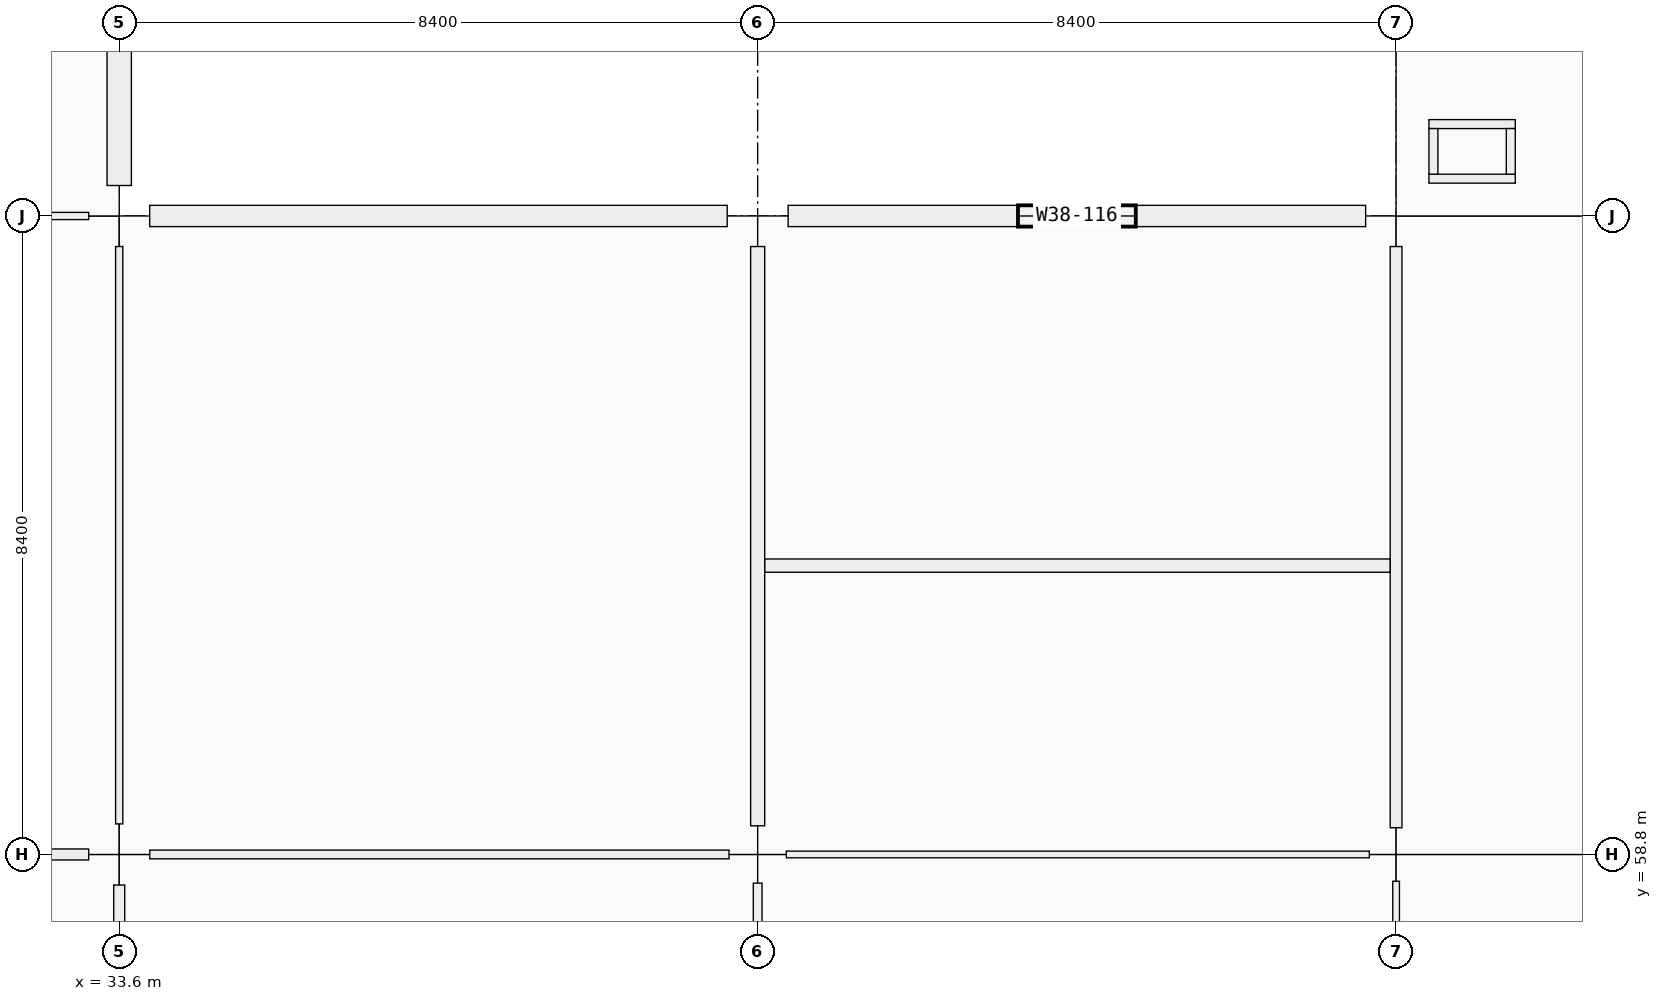
"""IFC4 building model, lengths in metres.
Left out: names, types, materials, properties, quantities, classifications, styles, units other than length and angle.
Written with IfcOpenShell. Run it as: python <this file> out.ifc"""

import sys

from ifc_helpers import new_model, si_unit, direction, frame, frame_2d, origin, origin_2d, place, context, subcontext, project, spatial, rectangle, extrude, element, fill, save


model = new_model("IFC4")
c1 = context("Model", 3, precision=1e-05, world=origin(), true_north=direction((0.0, 1.0)))
c2 = subcontext(c1, "Body", "Model", "MODEL_VIEW")
j1 = project(units=[si_unit("LENGTHUNIT", "METRE"), si_unit("PLANEANGLEUNIT", "RADIAN")], contexts=[c1])
p1 = place(None, origin())
s1 = spatial("IfcSite", under=j1, at=p1, CompositionType="ELEMENT")
p2 = place(p1, origin())
s2 = spatial("IfcBuilding", under=s1, at=p2, CompositionType="ELEMENT")
p3 = place(p2, frame((0.0, 0.0, 5.76)))
s3 = spatial("IfcBuildingStorey", under=s2, at=p3, CompositionType="ELEMENT", Elevation=5.76)
for number, where, z_axis, x_axis in (
    (1, (33.6, 58.8, 0.0), (0.0, 0.0, 1.0), (1.0, 0.0, 0.0)),
    (2, (33.6, 67.2, 0.0), (0.0, 0.0, 1.0), (1.0, 0.0, 0.0)),
):
    element("IfcColumn", number, at=place(p3, frame(where, z_axis=z_axis, x_axis=x_axis)), inside=s3, PredefinedType="COLUMN", context=c2, shape_type="SweptSolid", body=[
        extrude(rectangle(XDim=0.8, YDim=0.8, at=origin_2d()), origin(), (0.0, 0.0, 1.0), 4.5),
    ])
p4 = place(p3, frame((42.0, 58.8, 0.0), z_axis=(0.0, 0.0, 1.0), x_axis=(1.0, 0.0, 0.0)))
e3 = element("IfcColumn", 3, at=p4, inside=s3, PredefinedType="COLUMN", context=c2, shape_type="SweptSolid", body=[
    extrude(rectangle(XDim=0.75, YDim=0.75, at=origin_2d()), origin(), (0.0, 0.0, 1.0), 4.5),
])
p5 = place(p3, frame((42.0, 67.2, 0.0), z_axis=(0.0, 0.0, 1.0), x_axis=(1.0, 0.0, 0.0)))
e4 = element("IfcColumn", 4, at=p5, inside=s3, PredefinedType="COLUMN", context=c2, shape_type="SweptSolid", body=[
    extrude(rectangle(XDim=0.8, YDim=0.8, at=origin_2d()), origin(), (0.0, 0.0, 1.0), 4.5),
])
p6 = place(p3, frame((50.4, 58.8, 0.0), z_axis=(0.0, 0.0, 1.0), x_axis=(1.0, 0.0, 0.0)))
e5 = element("IfcColumn", 5, at=p6, inside=s3, PredefinedType="COLUMN", context=c2, shape_type="SweptSolid", body=[
    extrude(rectangle(XDim=0.7, YDim=0.7, at=origin_2d()), origin(), (0.0, 0.0, 1.0), 4.5),
])
p7 = place(p3, frame((50.4, 67.2, 0.0), z_axis=(0.0, 0.0, 1.0), x_axis=(1.0, 0.0, 0.0)))
e6 = element("IfcColumn", 6, at=p7, inside=s3, PredefinedType="COLUMN", context=c2, shape_type="SweptSolid", body=[
    extrude(rectangle(XDim=0.8, YDim=0.8, at=origin_2d()), origin(), (0.0, 0.0, 1.0), 4.5),
])
p8 = place(p3, frame((33.6, 75.199, 0.0), z_axis=(0.0, 0.0, 1.0), x_axis=(0.0, -1.0, 0.0)))
e7 = element("IfcWall", 7, at=p8, inside=s3, PredefinedType="SOLIDWALL", context=c2, shape_type="SweptSolid", body=[
    extrude(rectangle(XDim=7.598, YDim=0.32, at=frame_2d((3.799, 0.0))), origin(), (0.0, 0.0, 1.0), 3.4),
])
p9 = place(p8, frame((2.524, 0.0, 0.9)))
e8 = element("IfcOpeningElement", 8, at=p9, cuts=e7, PredefinedType="OPENING", context=c2, shape_type="SweptSolid", body=[
    extrude(rectangle(XDim=2.55, YDim=1.95, at=frame_2d((1.275, 0.975))), frame((0.0, 0.16, 0.0), z_axis=(0.0, -1.0, 0.0), x_axis=(1.0, 0.0, 0.0)), (0.0, 0.0, 1.0), 0.32),
])
p10 = place(p3, frame((34.001, 67.2, 0.0), z_axis=(0.0, 0.0, 1.0), x_axis=(1.0, 0.0, 0.0)))
e9 = element("IfcWall", 9, at=p10, inside=s3, PredefinedType="SOLIDWALL", context=c2, shape_type="SweptSolid", body=[
    extrude(rectangle(XDim=7.598, YDim=0.28, at=frame_2d((3.799, 0.0))), origin(), (0.0, 0.0, 1.0), 3.4),
])
p11 = place(p10, frame((3.149, 0.0, 0.9)))
e10 = element("IfcOpeningElement", 10, at=p11, cuts=e9, PredefinedType="OPENING", context=c2, shape_type="SweptSolid", body=[
    extrude(rectangle(XDim=1.3, YDim=1.95, at=frame_2d((0.65, 0.975))), frame((0.0, 0.14, 0.0), z_axis=(0.0, -1.0, 0.0), x_axis=(1.0, 0.0, 0.0)), (0.0, 0.0, 1.0), 0.28),
])
p12 = place(p3, frame((42.401, 67.2, 0.0), z_axis=(0.0, 0.0, 1.0), x_axis=(1.0, 0.0, 0.0)))
e11 = element("IfcWall", 11, at=p12, inside=s3, PredefinedType="SOLIDWALL", context=c2, shape_type="SweptSolid", body=[
    extrude(rectangle(XDim=7.598, YDim=0.28, at=frame_2d((3.799, 0.0))), origin(), (0.0, 0.0, 1.0), 3.4),
])
p13 = place(p12, frame((3.024, 0.0, 0.9)))
e12 = element("IfcOpeningElement", 12, at=p13, cuts=e11, PredefinedType="OPENING", context=c2, shape_type="SweptSolid", body=[
    extrude(rectangle(XDim=1.55, YDim=1.6, at=frame_2d((0.775, 0.8))), frame((0.0, 0.14, 0.0), z_axis=(0.0, -1.0, 0.0), x_axis=(1.0, 0.0, 0.0)), (0.0, 0.0, 1.0), 0.28),
])
for number, where, z_axis, x_axis in (
    (13, (50.832, 67.691, 0.0), (0.0, 0.0, 1.0), (1.0, 0.0, 0.0)),
    (14, (50.832, 68.409, 0.0), (0.0, 0.0, 1.0), (1.0, 0.0, 0.0)),
):
    element("IfcWall", number, at=place(p3, frame(where, z_axis=z_axis, x_axis=x_axis)), inside=s3, PredefinedType="PARTITIONING", context=c2, shape_type="SweptSolid", body=[
        extrude(rectangle(XDim=1.136, YDim=0.118, at=frame_2d((0.568, 0.0))), origin(), (0.0, 0.0, 1.0), 3.48),
    ])
for number, where, z_axis, x_axis in (
    (15, (50.891, 67.75, 0.0), (0.0, 0.0, 1.0), (0.0, 1.0, 0.0)),
    (16, (51.909, 67.75, 0.0), (0.0, 0.0, 1.0), (0.0, 1.0, 0.0)),
):
    element("IfcWall", number, at=place(p3, frame(where, z_axis=z_axis, x_axis=x_axis)), inside=s3, PredefinedType="PARTITIONING", context=c2, shape_type="SweptSolid", body=[
        extrude(rectangle(XDim=0.6, YDim=0.118, at=frame_2d((0.3, 0.0))), origin(), (0.0, 0.0, 1.0), 3.48),
    ])
p14 = place(p3, frame((25.602, 58.8, 0.0), z_axis=(0.0, 0.0, 1.0), x_axis=(1.0, 0.0, 0.0)))
e17 = element("IfcWall", 17, at=p14, inside=s3, PredefinedType="PARTITIONING", context=c2, shape_type="SweptSolid", body=[
    extrude(rectangle(XDim=7.596, YDim=0.145, at=frame_2d((3.798, 0.0))), origin(), (0.0, 0.0, 1.0), 2.4),
])
p15 = place(p14, frame((3.268, 0.0, 0.0)))
e18 = element("IfcOpeningElement", 18, at=p15, cuts=e17, PredefinedType="OPENING", context=c2, shape_type="SweptSolid", body=[
    extrude(rectangle(XDim=1.06, YDim=2.22, at=frame_2d((0.53, 1.11))), frame((0.0, 0.073, 0.0), z_axis=(0.0, -1.0, 0.0), x_axis=(1.0, 0.0, 0.0)), (0.0, 0.0, 1.0), 0.145),
])
p16 = place(p3, frame((25.602, 67.2, 0.0), z_axis=(0.0, 0.0, 1.0), x_axis=(1.0, 0.0, 0.0)))
e19 = element("IfcWall", 19, at=p16, inside=s3, PredefinedType="PARTITIONING", context=c2, shape_type="SweptSolid", body=[
    extrude(rectangle(XDim=7.596, YDim=0.095, at=frame_2d((3.798, 0.0))), origin(), (0.0, 0.0, 1.0), 2.4),
])
p17 = place(p16, frame((3.258, 0.0, 0.0)))
e20 = element("IfcOpeningElement", 20, at=p17, cuts=e19, PredefinedType="OPENING", context=c2, shape_type="SweptSolid", body=[
    extrude(rectangle(XDim=1.08, YDim=2.22, at=frame_2d((0.54, 1.11))), frame((0.0, 0.047, 0.0), z_axis=(0.0, -1.0, 0.0), x_axis=(1.0, 0.0, 0.0)), (0.0, 0.0, 1.0), 0.095),
])
p18 = place(p3, frame((34.002, 58.8, 0.0), z_axis=(0.0, 0.0, 1.0), x_axis=(1.0, 0.0, 0.0)))
e21 = element("IfcWall", 21, at=p18, inside=s3, PredefinedType="PARTITIONING", context=c2, shape_type="SweptSolid", body=[
    extrude(rectangle(XDim=7.621, YDim=0.115, at=frame_2d((3.811, 0.0))), origin(), (0.0, 0.0, 1.0), 2.4),
])
p19 = place(p18, frame((3.28, 0.0, 0.0)))
e22 = element("IfcOpeningElement", 22, at=p19, cuts=e21, PredefinedType="OPENING", context=c2, shape_type="SweptSolid", body=[
    extrude(rectangle(XDim=1.06, YDim=2.22, at=frame_2d((0.53, 1.11))), frame((0.0, 0.058, 0.0), z_axis=(0.0, -1.0, 0.0), x_axis=(1.0, 0.0, 0.0)), (0.0, 0.0, 1.0), 0.115),
])
p20 = place(p3, frame((42.377, 58.8, 0.0), z_axis=(0.0, 0.0, 1.0), x_axis=(1.0, 0.0, 0.0)))
e23 = element("IfcWall", 23, at=p20, inside=s3, PredefinedType="PARTITIONING", context=c2, shape_type="SweptSolid", body=[
    extrude(rectangle(XDim=7.671, YDim=0.088, at=frame_2d((3.835, 0.0))), origin(), (0.0, 0.0, 1.0), 2.4),
])
p21 = place(p3, frame((33.6, 50.802, 0.0), z_axis=(0.0, 0.0, 1.0), x_axis=(0.0, 1.0, 0.0)))
e24 = element("IfcWall", 24, at=p21, inside=s3, PredefinedType="PARTITIONING", context=c2, shape_type="SweptSolid", body=[
    extrude(rectangle(XDim=7.596, YDim=0.145, at=frame_2d((3.798, 0.0))), origin(), (0.0, 0.0, 1.0), 2.4),
])
p22 = place(p21, frame((3.318, 0.0, 0.0)))
e25 = element("IfcOpeningElement", 25, at=p22, cuts=e24, PredefinedType="OPENING", context=c2, shape_type="SweptSolid", body=[
    extrude(rectangle(XDim=0.96, YDim=2.18, at=frame_2d((0.48, 1.09))), frame((0.0, 0.073, 0.0), z_axis=(0.0, -1.0, 0.0), x_axis=(1.0, 0.0, 0.0)), (0.0, 0.0, 1.0), 0.145),
])
p23 = place(p3, frame((33.6, 59.202, 0.0), z_axis=(0.0, 0.0, 1.0), x_axis=(0.0, 1.0, 0.0)))
e26 = element("IfcWall", 26, at=p23, inside=s3, PredefinedType="PARTITIONING", context=c2, shape_type="SweptSolid", body=[
    extrude(rectangle(XDim=7.596, YDim=0.095, at=frame_2d((3.798, 0.0))), origin(), (0.0, 0.0, 1.0), 2.4),
])
p24 = place(p23, frame((3.308, 0.0, 0.0)))
e27 = element("IfcOpeningElement", 27, at=p24, cuts=e26, PredefinedType="OPENING", context=c2, shape_type="SweptSolid", body=[
    extrude(rectangle(XDim=0.98, YDim=2.18, at=frame_2d((0.49, 1.09))), frame((0.0, 0.047, 0.0), z_axis=(0.0, -1.0, 0.0), x_axis=(1.0, 0.0, 0.0)), (0.0, 0.0, 1.0), 0.095),
])
p25 = place(p3, frame((42.0, 50.752, 0.0), z_axis=(0.0, 0.0, 1.0), x_axis=(0.0, 1.0, 0.0)))
e28 = element("IfcWall", 28, at=p25, inside=s3, PredefinedType="PARTITIONING", context=c2, shape_type="SweptSolid", body=[
    extrude(rectangle(XDim=7.671, YDim=0.115, at=frame_2d((3.835, 0.0))), origin(), (0.0, 0.0, 1.0), 2.4),
])
p26 = place(p3, frame((42.0, 59.177, 0.0), z_axis=(0.0, 0.0, 1.0), x_axis=(0.0, 1.0, 0.0)))
e29 = element("IfcWall", 29, at=p26, inside=s3, PredefinedType="PARTITIONING", context=c2, shape_type="SweptSolid", body=[
    extrude(rectangle(XDim=7.621, YDim=0.185, at=frame_2d((3.811, 0.0))), origin(), (0.0, 0.0, 1.0), 2.4),
])
p27 = place(p3, frame((50.4, 50.777, 0.0), z_axis=(0.0, 0.0, 1.0), x_axis=(0.0, 1.0, 0.0)))
e30 = element("IfcWall", 30, at=p27, inside=s3, PredefinedType="PARTITIONING", context=c2, shape_type="SweptSolid", body=[
    extrude(rectangle(XDim=7.671, YDim=0.088, at=frame_2d((3.835, 0.0))), origin(), (0.0, 0.0, 1.0), 2.4),
])
p28 = place(p27, frame((1.193, 0.0, 0.0)))
e31 = element("IfcOpeningElement", 31, at=p28, cuts=e30, PredefinedType="OPENING", context=c2, shape_type="SweptSolid", body=[
    extrude(rectangle(XDim=0.94, YDim=2.15, at=frame_2d((0.47, 1.075))), frame((0.0, 0.044, 0.0), z_axis=(0.0, -1.0, 0.0), x_axis=(1.0, 0.0, 0.0)), (0.0, 0.0, 1.0), 0.088),
])
p29 = place(p27, frame((5.123, 0.0, 0.0)))
e32 = element("IfcOpeningElement", 32, at=p29, cuts=e30, PredefinedType="OPENING", context=c2, shape_type="SweptSolid", body=[
    extrude(rectangle(XDim=0.92, YDim=2.15, at=frame_2d((0.46, 1.075))), frame((0.0, 0.044, 0.0), z_axis=(0.0, -1.0, 0.0), x_axis=(1.0, 0.0, 0.0)), (0.0, 0.0, 1.0), 0.088),
])
p30 = place(p3, frame((50.4, 59.152, 0.0), z_axis=(0.0, 0.0, 1.0), x_axis=(0.0, 1.0, 0.0)))
e33 = element("IfcWall", 33, at=p30, inside=s3, PredefinedType="PARTITIONING", context=c2, shape_type="SweptSolid", body=[
    extrude(rectangle(XDim=7.646, YDim=0.155, at=frame_2d((3.823, 0.0))), origin(), (0.0, 0.0, 1.0), 2.4),
])
p31 = place(p30, frame((1.163, 0.0, 0.0)))
e34 = element("IfcOpeningElement", 34, at=p31, cuts=e33, PredefinedType="OPENING", context=c2, shape_type="SweptSolid", body=[
    extrude(rectangle(XDim=1.05, YDim=2.12, at=frame_2d((0.525, 1.06))), frame((0.0, 0.078, 0.0), z_axis=(0.0, -1.0, 0.0), x_axis=(1.0, 0.0, 0.0)), (0.0, 0.0, 1.0), 0.155),
])
p32 = place(p30, frame((5.103, 0.0, 0.0)))
e35 = element("IfcOpeningElement", 35, at=p32, cuts=e33, PredefinedType="OPENING", context=c2, shape_type="SweptSolid", body=[
    extrude(rectangle(XDim=1.01, YDim=2.12, at=frame_2d((0.505, 1.06))), frame((0.0, 0.078, 0.0), z_axis=(0.0, -1.0, 0.0), x_axis=(1.0, 0.0, 0.0)), (0.0, 0.0, 1.0), 0.155),
])
p33 = place(p3, frame((42.094, 62.6, 0.0), z_axis=(0.0, 0.0, 1.0), x_axis=(1.0, 0.0, 0.0)))
e36 = element("IfcWall", 36, at=p33, inside=s3, PredefinedType="PARTITIONING", context=c2, shape_type="SweptSolid", body=[
    extrude(rectangle(XDim=8.226, YDim=0.175, at=frame_2d((4.113, 0.0))), origin(), (0.0, 0.0, 1.0), 2.4),
])
p34 = place(p11, origin())
e37 = element("IfcWindow", 37, at=p34, inside=s3, PartitioningType="SINGLE_PANEL", PredefinedType="WINDOW", context=c2, shape_type="SweptSolid", body=[
    extrude(rectangle(XDim=1.3, YDim=1.95, at=frame_2d((0.65, 0.975))), frame((0.0, 0.03, 0.0), z_axis=(0.0, -1.0, 0.0), x_axis=(1.0, 0.0, 0.0)), (0.0, 0.0, 1.0), 0.06),
])
fill(e10, e37)
p35 = place(p13, origin())
e38 = element("IfcWindow", 38, at=p35, inside=s3, PartitioningType="SINGLE_PANEL", PredefinedType="WINDOW", context=c2, shape_type="SweptSolid", body=[
    extrude(rectangle(XDim=1.55, YDim=1.6, at=frame_2d((0.775, 0.8))), frame((0.0, 0.03, 0.0), z_axis=(0.0, -1.0, 0.0), x_axis=(1.0, 0.0, 0.0)), (0.0, 0.0, 1.0), 0.06),
])
fill(e12, e38)
p36 = place(p31, origin())
e39 = element("IfcDoor", 39, at=p36, inside=s3, OperationType="SINGLE_SWING_RIGHT", PredefinedType="DOOR", context=c2, shape_type="SweptSolid", body=[
    extrude(rectangle(XDim=1.05, YDim=2.12, at=frame_2d((0.525, 1.06))), frame((0.0, 0.025, 0.0), z_axis=(0.0, -1.0, 0.0), x_axis=(1.0, 0.0, 0.0)), (0.0, 0.0, 1.0), 0.05),
])
fill(e34, e39)
p37 = place(p32, origin())
e40 = element("IfcDoor", 40, at=p37, inside=s3, OperationType="SINGLE_SWING_LEFT", PredefinedType="DOOR", context=c2, shape_type="SweptSolid", body=[
    extrude(rectangle(XDim=1.01, YDim=2.12, at=frame_2d((0.505, 1.06))), frame((0.0, 0.025, 0.0), z_axis=(0.0, -1.0, 0.0), x_axis=(1.0, 0.0, 0.0)), (0.0, 0.0, 1.0), 0.05),
])
fill(e35, e40)
p38 = place(p19, origin())
e41 = element("IfcDoor", 41, at=p38, inside=s3, OperationType="SINGLE_SWING_LEFT", PredefinedType="DOOR", context=c2, shape_type="SweptSolid", body=[
    extrude(rectangle(XDim=1.06, YDim=2.22, at=frame_2d((0.53, 1.11))), frame((0.0, 0.025, 0.0), z_axis=(0.0, -1.0, 0.0), x_axis=(1.0, 0.0, 0.0)), (0.0, 0.0, 1.0), 0.05),
])
fill(e22, e41)
p39 = place(p24, origin())
e42 = element("IfcDoor", 42, at=p39, inside=s3, OperationType="SINGLE_SWING_LEFT", PredefinedType="DOOR", context=c2, shape_type="SweptSolid", body=[
    extrude(rectangle(XDim=0.98, YDim=2.18, at=frame_2d((0.49, 1.09))), frame((0.0, 0.025, 0.0), z_axis=(0.0, -1.0, 0.0), x_axis=(1.0, 0.0, 0.0)), (0.0, 0.0, 1.0), 0.05),
])
fill(e27, e42)
save(model, sys.argv[1])
